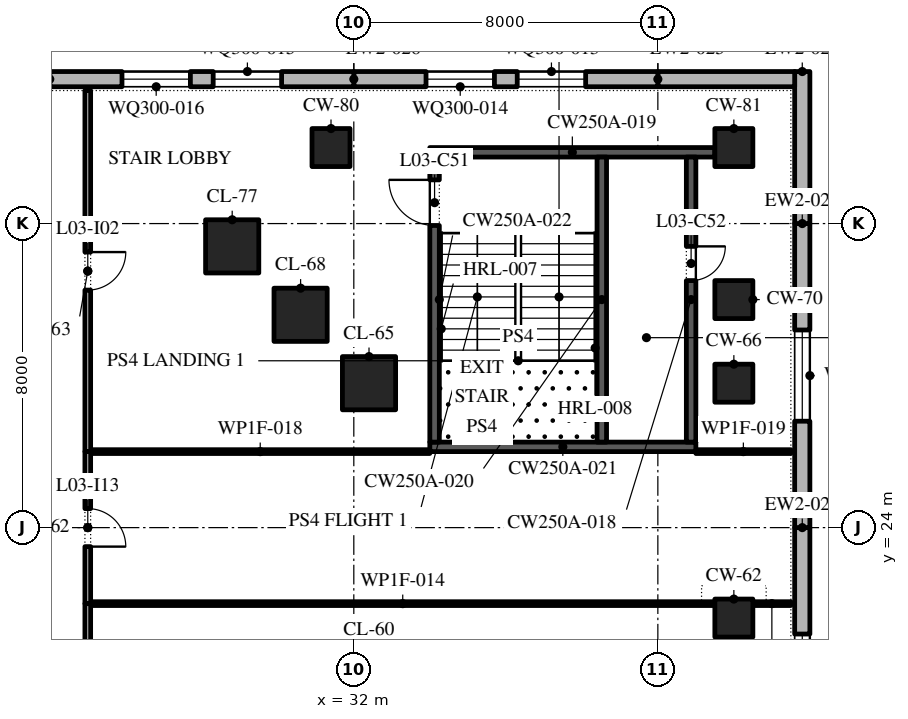
"""IFC4 building model, lengths in metres.
Left out: names, types, materials, properties, quantities, classifications, styles, units other than length and angle.
Written with IfcOpenShell. Run it as: python <this file> out.ifc"""

import sys

from ifc_helpers import new_model, si_unit, direction, frame, frame_2d, origin, origin_2d, place, context, subcontext, project, spatial, polyline, rectangle, outline, extrude, element, fill, save


model = new_model("IFC4")
c1 = context("Model", 3, precision=1e-05, world=origin(), true_north=direction((0.0, 1.0)))
c2 = subcontext(c1, "Body", "Model", "MODEL_VIEW")
j1 = project(units=[si_unit("LENGTHUNIT", "METRE"), si_unit("PLANEANGLEUNIT", "RADIAN")], contexts=[c1])
p1 = place(None, origin())
s1 = spatial("IfcSite", under=j1, at=p1, CompositionType="ELEMENT")
p2 = place(p1, origin())
s2 = spatial("IfcBuilding", under=s1, at=p2, CompositionType="ELEMENT")
p3 = place(p2, frame((0.0, 0.0, 19.2)))
s3 = spatial("IfcBuildingStorey", under=s2, at=p3, CompositionType="ELEMENT", Elevation=19.2)
p4 = place(p3, frame((42.0, 21.62, 0.0), z_axis=(0.0, 0.0, 1.0), x_axis=(1.0, 0.0, 0.0)))
e1 = element("IfcColumn", 1, at=p4, inside=s3, PredefinedType="COLUMN", context=c2, shape_type="SweptSolid", body=[
    extrude(rectangle(XDim=1.0, YDim=1.0, at=origin_2d()), origin(), (0.0, 0.0, 1.0), 4.8),
])
p5 = place(p3, frame((32.4, 27.8, 0.0), z_axis=(0.0, 0.0, 1.0), x_axis=(1.0, 0.0, 0.0)))
e2 = element("IfcColumn", 2, at=p5, inside=s3, PredefinedType="COLUMN", context=c2, shape_type="SweptSolid", body=[
    extrude(rectangle(XDim=1.4, YDim=1.4, at=origin_2d()), origin(), (0.0, 0.0, 1.0), 4.8),
])
p6 = place(p3, frame((42.0, 27.8, 0.0), z_axis=(0.0, 0.0, 1.0), x_axis=(1.0, 0.0, 0.0)))
e3 = element("IfcColumn", 3, at=p6, inside=s3, PredefinedType="COLUMN", context=c2, shape_type="SweptSolid", body=[
    extrude(rectangle(XDim=1.0, YDim=1.0, at=origin_2d()), origin(), (0.0, 0.0, 1.0), 4.8),
])
p7 = place(p3, frame((30.6, 29.6, 0.0), z_axis=(0.0, 0.0, 1.0), x_axis=(1.0, 0.0, 0.0)))
e4 = element("IfcColumn", 4, at=p7, inside=s3, PredefinedType="COLUMN", context=c2, shape_type="SweptSolid", body=[
    extrude(rectangle(XDim=1.4, YDim=1.4, at=origin_2d()), origin(), (0.0, 0.0, 1.0), 4.8),
])
p8 = place(p3, frame((42.0, 30.0, 0.0), z_axis=(0.0, 0.0, 1.0), x_axis=(1.0, 0.0, 0.0)))
e5 = element("IfcColumn", 5, at=p8, inside=s3, PredefinedType="COLUMN", context=c2, shape_type="SweptSolid", body=[
    extrude(rectangle(XDim=1.0, YDim=1.0, at=origin_2d()), origin(), (0.0, 0.0, 1.0), 4.8),
])
p9 = place(p3, frame((28.8, 31.4, 0.0), z_axis=(0.0, 0.0, 1.0), x_axis=(1.0, 0.0, 0.0)))
e6 = element("IfcColumn", 6, at=p9, inside=s3, PredefinedType="COLUMN", context=c2, shape_type="SweptSolid", body=[
    extrude(rectangle(XDim=1.4, YDim=1.4, at=origin_2d()), origin(), (0.0, 0.0, 1.0), 4.8),
])
for number, where, z_axis, x_axis in (
    (7, (31.4, 34.0, 0.0), (0.0, 0.0, 1.0), (1.0, 0.0, 0.0)),
    (8, (42.0, 34.0, 0.0), (0.0, 0.0, 1.0), (1.0, 0.0, 0.0)),
):
    element("IfcColumn", number, at=place(p3, frame(where, z_axis=z_axis, x_axis=x_axis)), inside=s3, PredefinedType="COLUMN", context=c2, shape_type="SweptSolid", body=[
        extrude(rectangle(XDim=1.0, YDim=1.0, at=origin_2d()), origin(), (0.0, 0.0, 1.0), 4.8),
    ])
p10 = place(p3, frame((43.8, 16.0, 0.0), z_axis=(0.0, 0.0, 1.0), x_axis=(0.0, 1.0, 0.0)))
e9 = element("IfcWall", 9, at=p10, inside=s3, PredefinedType="STANDARD", context=c2, shape_type="SweptSolid", body=[
    extrude(rectangle(XDim=8.0, YDim=0.4, at=frame_2d((4.0, 0.0))), origin(), (0.0, 0.0, 1.0), 4.5),
])
p11 = place(p10, frame((2.8, 0.0, 0.9)))
e10 = element("IfcOpeningElement", 10, at=p11, cuts=e9, PredefinedType="OPENING", context=c2, shape_type="SweptSolid", body=[
    extrude(outline(polyline([(0.0, 0.0), (2.4, 0.0), (2.4, 1.5), (2.378, 1.758), (2.313, 2.009), (2.207, 2.245), (2.063, 2.46), (1.885, 2.648), (1.677, 2.804), (1.447, 2.922), (1.2, 3.0), (0.953, 2.922), (0.722, 2.804), (0.515, 2.648), (0.337, 2.46), (0.193, 2.245), (0.087, 2.009), (0.022, 1.758), (0.0, 1.5), (0.0, 0.0)])), frame((0.0, 0.21, 0.0), z_axis=(0.0, -1.0, 0.0), x_axis=(1.0, 0.0, 0.0)), (0.0, 0.0, 1.0), 0.42),
])
p12 = place(p3, frame((43.8, 24.0, 0.0), z_axis=(0.0, 0.0, 1.0), x_axis=(0.0, 1.0, 0.0)))
e11 = element("IfcWall", 11, at=p12, inside=s3, PredefinedType="STANDARD", context=c2, shape_type="SweptSolid", body=[
    extrude(rectangle(XDim=8.0, YDim=0.4, at=frame_2d((4.0, 0.0))), origin(), (0.0, 0.0, 1.0), 4.5),
])
p13 = place(p12, frame((2.8, 0.0, 0.9)))
e12 = element("IfcOpeningElement", 12, at=p13, cuts=e11, PredefinedType="OPENING", context=c2, shape_type="SweptSolid", body=[
    extrude(outline(polyline([(0.0, 0.0), (2.4, 0.0), (2.4, 1.5), (2.378, 1.758), (2.313, 2.009), (2.207, 2.245), (2.063, 2.46), (1.885, 2.648), (1.677, 2.804), (1.447, 2.922), (1.2, 3.0), (0.953, 2.922), (0.722, 2.804), (0.515, 2.648), (0.337, 2.46), (0.193, 2.245), (0.087, 2.009), (0.022, 1.758), (0.0, 1.5), (0.0, 0.0)])), frame((0.0, 0.21, 0.0), z_axis=(0.0, -1.0, 0.0), x_axis=(1.0, 0.0, 0.0)), (0.0, 0.0, 1.0), 0.42),
])
p14 = place(p3, frame((43.8, 32.0, 0.0), z_axis=(0.0, 0.0, 1.0), x_axis=(0.0, 1.0, 0.0)))
e13 = element("IfcWall", 13, at=p14, inside=s3, PredefinedType="STANDARD", context=c2, shape_type="SweptSolid", body=[
    extrude(rectangle(XDim=4.0, YDim=0.4, at=frame_2d((2.0, 0.0))), origin(), (0.0, 0.0, 1.0), 4.5),
])
p15 = place(p3, frame((43.6, 35.8, 0.0), z_axis=(0.0, 0.0, 1.0), x_axis=(-1.0, 0.0, 0.0)))
e14 = element("IfcWall", 14, at=p15, inside=s3, PredefinedType="STANDARD", context=c2, shape_type="SweptSolid", body=[
    extrude(rectangle(XDim=3.6, YDim=0.4, at=frame_2d((1.8, 0.0))), origin(), (0.0, 0.0, 1.0), 4.5),
])
p16 = place(p3, frame((40.0, 35.8, 0.0), z_axis=(0.0, 0.0, 1.0), x_axis=(-1.0, 0.0, 0.0)))
e15 = element("IfcWall", 15, at=p16, inside=s3, PredefinedType="STANDARD", context=c2, shape_type="SweptSolid", body=[
    extrude(rectangle(XDim=8.0, YDim=0.4, at=frame_2d((4.0, 0.0))), origin(), (0.0, 0.0, 1.0), 4.5),
])
p17 = place(p16, frame((1.9, 0.0, 0.9)))
e16 = element("IfcOpeningElement", 16, at=p17, cuts=e15, PredefinedType="OPENING", context=c2, shape_type="SweptSolid", body=[
    extrude(outline(polyline([(0.0, 0.0), (1.8, 0.0), (1.8, 1.5), (1.785, 1.729), (1.738, 1.954), (1.662, 2.17), (1.558, 2.375), (1.427, 2.563), (1.271, 2.732), (1.095, 2.879), (0.9, 3.0), (0.705, 2.879), (0.529, 2.732), (0.373, 2.563), (0.242, 2.375), (0.138, 2.17), (0.062, 1.954), (0.015, 1.729), (0.0, 1.5), (0.0, 0.0)])), frame((0.0, 0.21, 0.0), z_axis=(0.0, -1.0, 0.0), x_axis=(1.0, 0.0, 0.0)), (0.0, 0.0, 1.0), 0.42),
])
p18 = place(p16, frame((4.3, 0.0, 0.9)))
e17 = element("IfcOpeningElement", 17, at=p18, cuts=e15, PredefinedType="OPENING", context=c2, shape_type="SweptSolid", body=[
    extrude(outline(polyline([(0.0, 0.0), (1.8, 0.0), (1.8, 1.5), (1.785, 1.729), (1.738, 1.954), (1.662, 2.17), (1.558, 2.375), (1.427, 2.563), (1.271, 2.732), (1.095, 2.879), (0.9, 3.0), (0.705, 2.879), (0.529, 2.732), (0.373, 2.563), (0.242, 2.375), (0.138, 2.17), (0.062, 1.954), (0.015, 1.729), (0.0, 1.5), (0.0, 0.0)])), frame((0.0, 0.21, 0.0), z_axis=(0.0, -1.0, 0.0), x_axis=(1.0, 0.0, 0.0)), (0.0, 0.0, 1.0), 0.42),
])
p19 = place(p3, frame((32.0, 35.8, 0.0), z_axis=(0.0, 0.0, 1.0), x_axis=(-1.0, 0.0, 0.0)))
e18 = element("IfcWall", 18, at=p19, inside=s3, PredefinedType="STANDARD", context=c2, shape_type="SweptSolid", body=[
    extrude(rectangle(XDim=8.0, YDim=0.4, at=frame_2d((4.0, 0.0))), origin(), (0.0, 0.0, 1.0), 4.5),
])
p20 = place(p19, frame((1.9, 0.0, 0.9)))
e19 = element("IfcOpeningElement", 19, at=p20, cuts=e18, PredefinedType="OPENING", context=c2, shape_type="SweptSolid", body=[
    extrude(outline(polyline([(0.0, 0.0), (1.8, 0.0), (1.8, 1.5), (1.785, 1.729), (1.738, 1.954), (1.662, 2.17), (1.558, 2.375), (1.427, 2.563), (1.271, 2.732), (1.095, 2.879), (0.9, 3.0), (0.705, 2.879), (0.529, 2.732), (0.373, 2.563), (0.242, 2.375), (0.138, 2.17), (0.062, 1.954), (0.015, 1.729), (0.0, 1.5), (0.0, 0.0)])), frame((0.0, 0.21, 0.0), z_axis=(0.0, -1.0, 0.0), x_axis=(1.0, 0.0, 0.0)), (0.0, 0.0, 1.0), 0.42),
])
p21 = place(p19, frame((4.3, 0.0, 0.9)))
e20 = element("IfcOpeningElement", 20, at=p21, cuts=e18, PredefinedType="OPENING", context=c2, shape_type="SweptSolid", body=[
    extrude(outline(polyline([(0.0, 0.0), (1.8, 0.0), (1.8, 1.5), (1.785, 1.729), (1.738, 1.954), (1.662, 2.17), (1.558, 2.375), (1.427, 2.563), (1.271, 2.732), (1.095, 2.879), (0.9, 3.0), (0.705, 2.879), (0.529, 2.732), (0.373, 2.563), (0.242, 2.375), (0.138, 2.17), (0.062, 1.954), (0.015, 1.729), (0.0, 1.5), (0.0, 0.0)])), frame((0.0, 0.21, 0.0), z_axis=(0.0, -1.0, 0.0), x_axis=(1.0, 0.0, 0.0)), (0.0, 0.0, 1.0), 0.42),
])
p22 = place(p3, frame((34.0, 26.125, 0.0), z_axis=(0.0, 0.0, 1.0), x_axis=(1.0, 0.0, 0.0)))
e21 = element("IfcWall", 21, at=p22, inside=s3, PredefinedType="SHEAR", context=c2, shape_type="SweptSolid", body=[
    extrude(rectangle(XDim=7.0, YDim=0.25, at=frame_2d((3.5, 0.0))), origin(), (0.0, 0.0, 1.0), 4.5),
])
p23 = place(p3, frame((34.0, 33.875, 0.0), z_axis=(0.0, 0.0, 1.0), x_axis=(1.0, 0.0, 0.0)))
e22 = element("IfcWall", 22, at=p23, inside=s3, PredefinedType="SHEAR", context=c2, shape_type="SweptSolid", body=[
    extrude(rectangle(XDim=7.5, YDim=0.25, at=frame_2d((3.75, 0.0))), origin(), (0.0, 0.0, 1.0), 4.5),
])
p24 = place(p3, frame((34.125, 26.25, 0.0), z_axis=(0.0, 0.0, 1.0), x_axis=(0.0, 1.0, 0.0)))
e23 = element("IfcWall", 23, at=p24, inside=s3, PredefinedType="SHEAR", context=c2, shape_type="SweptSolid", body=[
    extrude(rectangle(XDim=7.5, YDim=0.25, at=frame_2d((3.75, 0.0))), origin(), (0.0, 0.0, 1.0), 4.5),
])
p25 = place(p24, frame((5.7, 0.0, 0.0)))
e24 = element("IfcOpeningElement", 24, at=p25, cuts=e23, PredefinedType="OPENING", context=c2, shape_type="SweptSolid", body=[
    extrude(rectangle(XDim=1.2, YDim=2.1, at=frame_2d((0.6, 1.05))), frame((0.0, 0.135, 0.0), z_axis=(0.0, -1.0, 0.0), x_axis=(1.0, 0.0, 0.0)), (0.0, 0.0, 1.0), 0.27),
])
p26 = place(p3, frame((40.875, 26.25, 0.0), z_axis=(0.0, 0.0, 1.0), x_axis=(0.0, 1.0, 0.0)))
e25 = element("IfcWall", 25, at=p26, inside=s3, PredefinedType="SHEAR", context=c2, shape_type="SweptSolid", body=[
    extrude(rectangle(XDim=7.5, YDim=0.25, at=frame_2d((3.75, 0.0))), origin(), (0.0, 0.0, 1.0), 4.5),
])
p27 = place(p26, frame((4.25, 0.0, 0.0)))
e26 = element("IfcOpeningElement", 26, at=p27, cuts=e25, PredefinedType="OPENING", context=c2, shape_type="SweptSolid", body=[
    extrude(rectangle(XDim=0.9, YDim=2.1, at=frame_2d((0.45, 1.05))), frame((0.0, 0.135, 0.0), z_axis=(0.0, -1.0, 0.0), x_axis=(1.0, 0.0, 0.0)), (0.0, 0.0, 1.0), 0.27),
])
p28 = place(p3, frame((38.525, 26.25, 0.0), z_axis=(0.0, 0.0, 1.0), x_axis=(0.0, 1.0, 0.0)))
e27 = element("IfcWall", 27, at=p28, inside=s3, PredefinedType="SHEAR", context=c2, shape_type="SweptSolid", body=[
    extrude(rectangle(XDim=7.5, YDim=0.25, at=frame_2d((3.75, 0.0))), origin(), (0.0, 0.0, 1.0), 4.5),
])
p29 = place(p3, frame((25.075, 22.0, 0.0), z_axis=(0.0, 0.0, 1.0), x_axis=(1.0, 0.0, 0.0)))
e28 = element("IfcWall", 28, at=p29, inside=s3, PredefinedType="PARTITIONING", context=c2, shape_type="SweptSolid", body=[
    extrude(rectangle(XDim=16.425, YDim=0.1, at=frame_2d((8.212, 0.0))), origin(), (0.0, 0.0, 1.0), 4.5),
])
p30 = place(p3, frame((42.5, 22.0, 0.0), z_axis=(0.0, 0.0, 1.0), x_axis=(1.0, 0.0, 0.0)))
e29 = element("IfcWall", 29, at=p30, inside=s3, PredefinedType="PARTITIONING", context=c2, shape_type="SweptSolid", body=[
    extrude(rectangle(XDim=1.0, YDim=0.1, at=frame_2d((0.5, 0.0))), origin(), (0.0, 0.0, 1.0), 4.5),
])
p31 = place(p3, frame((25.075, 26.0, 0.0), z_axis=(0.0, 0.0, 1.0), x_axis=(1.0, 0.0, 0.0)))
e30 = element("IfcWall", 30, at=p31, inside=s3, PredefinedType="PARTITIONING", context=c2, shape_type="SweptSolid", body=[
    extrude(rectangle(XDim=8.925, YDim=0.1, at=frame_2d((4.462, 0.0))), origin(), (0.0, 0.0, 1.0), 4.5),
])
p32 = place(p3, frame((41.0, 26.0, 0.0), z_axis=(0.0, 0.0, 1.0), x_axis=(1.0, 0.0, 0.0)))
e31 = element("IfcWall", 31, at=p32, inside=s3, PredefinedType="PARTITIONING", context=c2, shape_type="SweptSolid", body=[
    extrude(rectangle(XDim=2.5, YDim=0.1, at=frame_2d((1.25, 0.0))), origin(), (0.0, 0.0, 1.0), 4.5),
])
p33 = place(p3, frame((25.0, 10.0, 0.0), z_axis=(0.0, 0.0, 1.0), x_axis=(0.0, 1.0, 0.0)))
e32 = element("IfcWall", 32, at=p33, inside=s3, PredefinedType="PARTITIONING", context=c2, shape_type="SweptSolid", body=[
    extrude(rectangle(XDim=12.0, YDim=0.15, at=frame_2d((6.0, 0.0))), origin(), (0.0, 0.0, 1.0), 4.5),
])
p34 = place(p33, frame((5.1, 0.0, 0.0)))
e33 = element("IfcOpeningElement", 33, at=p34, cuts=e32, PredefinedType="OPENING", context=c2, shape_type="SweptSolid", body=[
    extrude(rectangle(XDim=1.8, YDim=2.1, at=frame_2d((0.9, 1.05))), frame((0.0, 0.085, 0.0), z_axis=(0.0, -1.0, 0.0), x_axis=(1.0, 0.0, 0.0)), (0.0, 0.0, 1.0), 0.17),
])
p35 = place(p3, frame((25.0, 22.0, 0.0), z_axis=(0.0, 0.0, 1.0), x_axis=(0.0, 1.0, 0.0)))
e34 = element("IfcWall", 34, at=p35, inside=s3, PredefinedType="PARTITIONING", context=c2, shape_type="SweptSolid", body=[
    extrude(rectangle(XDim=4.0, YDim=0.15, at=frame_2d((2.0, 0.0))), origin(), (0.0, 0.0, 1.0), 4.5),
])
p36 = place(p35, frame((1.5, 0.0, 0.0)))
e35 = element("IfcOpeningElement", 35, at=p36, cuts=e34, PredefinedType="OPENING", context=c2, shape_type="SweptSolid", body=[
    extrude(rectangle(XDim=1.0, YDim=2.1, at=frame_2d((0.5, 1.05))), frame((0.0, 0.085, 0.0), z_axis=(0.0, -1.0, 0.0), x_axis=(1.0, 0.0, 0.0)), (0.0, 0.0, 1.0), 0.17),
])
p37 = place(p3, frame((25.0, 26.0, 0.0), z_axis=(0.0, 0.0, 1.0), x_axis=(0.0, 1.0, 0.0)))
e36 = element("IfcWall", 36, at=p37, inside=s3, PredefinedType="PARTITIONING", context=c2, shape_type="SweptSolid", body=[
    extrude(rectangle(XDim=9.5, YDim=0.15, at=frame_2d((4.75, 0.0))), origin(), (0.0, 0.0, 1.0), 4.5),
])
p38 = place(p37, frame((4.25, 0.0, 0.0)))
e37 = element("IfcOpeningElement", 37, at=p38, cuts=e36, PredefinedType="OPENING", context=c2, shape_type="SweptSolid", body=[
    extrude(rectangle(XDim=1.0, YDim=2.1, at=frame_2d((0.5, 1.05))), frame((0.0, 0.085, 0.0), z_axis=(0.0, -1.0, 0.0), x_axis=(1.0, 0.0, 0.0)), (0.0, 0.0, 1.0), 0.17),
])
p39 = place(p11, origin())
e38 = element("IfcWindow", 38, at=p39, inside=s3, PartitioningType="DOUBLE_PANEL_VERTICAL", PredefinedType="WINDOW", context=c2, shape_type="SweptSolid", body=[
    extrude(outline(polyline([(0.0, 0.0), (2.4, 0.0), (2.4, 1.5), (2.378, 1.758), (2.313, 2.009), (2.207, 2.245), (2.063, 2.46), (1.885, 2.648), (1.677, 2.804), (1.447, 2.922), (1.2, 3.0), (0.953, 2.922), (0.722, 2.804), (0.515, 2.648), (0.337, 2.46), (0.193, 2.245), (0.087, 2.009), (0.022, 1.758), (0.0, 1.5), (0.0, 0.0)])), frame((0.0, 0.03, 0.0), z_axis=(0.0, -1.0, 0.0), x_axis=(1.0, 0.0, 0.0)), (0.0, 0.0, 1.0), 0.06),
])
fill(e10, e38)
p40 = place(p13, origin())
e39 = element("IfcWindow", 39, at=p40, inside=s3, PartitioningType="DOUBLE_PANEL_VERTICAL", PredefinedType="WINDOW", context=c2, shape_type="SweptSolid", body=[
    extrude(outline(polyline([(0.0, 0.0), (2.4, 0.0), (2.4, 1.5), (2.378, 1.758), (2.313, 2.009), (2.207, 2.245), (2.063, 2.46), (1.885, 2.648), (1.677, 2.804), (1.447, 2.922), (1.2, 3.0), (0.953, 2.922), (0.722, 2.804), (0.515, 2.648), (0.337, 2.46), (0.193, 2.245), (0.087, 2.009), (0.022, 1.758), (0.0, 1.5), (0.0, 0.0)])), frame((0.0, 0.03, 0.0), z_axis=(0.0, -1.0, 0.0), x_axis=(1.0, 0.0, 0.0)), (0.0, 0.0, 1.0), 0.06),
])
fill(e12, e39)
p41 = place(p17, origin())
e40 = element("IfcWindow", 40, at=p41, inside=s3, PartitioningType="DOUBLE_PANEL_VERTICAL", PredefinedType="WINDOW", context=c2, shape_type="SweptSolid", body=[
    extrude(outline(polyline([(0.0, 0.0), (1.8, 0.0), (1.8, 1.5), (1.785, 1.729), (1.738, 1.954), (1.662, 2.17), (1.558, 2.375), (1.427, 2.563), (1.271, 2.732), (1.095, 2.879), (0.9, 3.0), (0.705, 2.879), (0.529, 2.732), (0.373, 2.563), (0.242, 2.375), (0.138, 2.17), (0.062, 1.954), (0.015, 1.729), (0.0, 1.5), (0.0, 0.0)])), frame((0.0, 0.03, 0.0), z_axis=(0.0, -1.0, 0.0), x_axis=(1.0, 0.0, 0.0)), (0.0, 0.0, 1.0), 0.06),
])
fill(e16, e40)
p42 = place(p18, origin())
e41 = element("IfcWindow", 41, at=p42, inside=s3, PartitioningType="DOUBLE_PANEL_VERTICAL", PredefinedType="WINDOW", context=c2, shape_type="SweptSolid", body=[
    extrude(outline(polyline([(0.0, 0.0), (1.8, 0.0), (1.8, 1.5), (1.785, 1.729), (1.738, 1.954), (1.662, 2.17), (1.558, 2.375), (1.427, 2.563), (1.271, 2.732), (1.095, 2.879), (0.9, 3.0), (0.705, 2.879), (0.529, 2.732), (0.373, 2.563), (0.242, 2.375), (0.138, 2.17), (0.062, 1.954), (0.015, 1.729), (0.0, 1.5), (0.0, 0.0)])), frame((0.0, 0.03, 0.0), z_axis=(0.0, -1.0, 0.0), x_axis=(1.0, 0.0, 0.0)), (0.0, 0.0, 1.0), 0.06),
])
fill(e17, e41)
p43 = place(p20, origin())
e42 = element("IfcWindow", 42, at=p43, inside=s3, PartitioningType="DOUBLE_PANEL_VERTICAL", PredefinedType="WINDOW", context=c2, shape_type="SweptSolid", body=[
    extrude(outline(polyline([(0.0, 0.0), (1.8, 0.0), (1.8, 1.5), (1.785, 1.729), (1.738, 1.954), (1.662, 2.17), (1.558, 2.375), (1.427, 2.563), (1.271, 2.732), (1.095, 2.879), (0.9, 3.0), (0.705, 2.879), (0.529, 2.732), (0.373, 2.563), (0.242, 2.375), (0.138, 2.17), (0.062, 1.954), (0.015, 1.729), (0.0, 1.5), (0.0, 0.0)])), frame((0.0, 0.03, 0.0), z_axis=(0.0, -1.0, 0.0), x_axis=(1.0, 0.0, 0.0)), (0.0, 0.0, 1.0), 0.06),
])
fill(e19, e42)
p44 = place(p21, origin())
e43 = element("IfcWindow", 43, at=p44, inside=s3, PartitioningType="DOUBLE_PANEL_VERTICAL", PredefinedType="WINDOW", context=c2, shape_type="SweptSolid", body=[
    extrude(outline(polyline([(0.0, 0.0), (1.8, 0.0), (1.8, 1.5), (1.785, 1.729), (1.738, 1.954), (1.662, 2.17), (1.558, 2.375), (1.427, 2.563), (1.271, 2.732), (1.095, 2.879), (0.9, 3.0), (0.705, 2.879), (0.529, 2.732), (0.373, 2.563), (0.242, 2.375), (0.138, 2.17), (0.062, 1.954), (0.015, 1.729), (0.0, 1.5), (0.0, 0.0)])), frame((0.0, 0.03, 0.0), z_axis=(0.0, -1.0, 0.0), x_axis=(1.0, 0.0, 0.0)), (0.0, 0.0, 1.0), 0.06),
])
fill(e20, e43)
p45 = place(p25, origin())
e44 = element("IfcDoor", 44, at=p45, inside=s3, OperationType="SINGLE_SWING_LEFT", PredefinedType="DOOR", context=c2, shape_type="SweptSolid", body=[
    extrude(rectangle(XDim=1.2, YDim=2.1, at=frame_2d((0.6, 1.05))), frame((0.0, 0.025, 0.0), z_axis=(0.0, -1.0, 0.0), x_axis=(1.0, 0.0, 0.0)), (0.0, 0.0, 1.0), 0.05),
])
fill(e24, e44)
p46 = place(p27, frame((0.9, 0.2, 0.0), z_axis=(0.0, 0.0, 1.0), x_axis=(-1.0, 0.0, 0.0)))
e45 = element("IfcDoor", 45, at=p46, inside=s3, OperationType="SINGLE_SWING_RIGHT", PredefinedType="DOOR", context=c2, shape_type="SweptSolid", body=[
    extrude(rectangle(XDim=0.9, YDim=2.1, at=frame_2d((0.45, 1.05))), frame((0.0, 0.125, 0.0), z_axis=(0.0, -1.0, 0.0), x_axis=(1.0, 0.0, 0.0)), (0.0, 0.0, 1.0), 0.05),
])
fill(e26, e45)
p47 = place(p38, frame((1.0, 0.0, 0.0), z_axis=(0.0, 0.0, 1.0), x_axis=(-1.0, 0.0, 0.0)))
e46 = element("IfcDoor", 46, at=p47, inside=s3, OperationType="SINGLE_SWING_RIGHT", PredefinedType="DOOR", context=c2, shape_type="SweptSolid", body=[
    extrude(rectangle(XDim=1.0, YDim=2.1, at=frame_2d((0.5, 1.05))), frame((0.0, 0.025, 0.0), z_axis=(0.0, -1.0, 0.0), x_axis=(1.0, 0.0, 0.0)), (0.0, 0.0, 1.0), 0.05),
])
fill(e37, e46)
p48 = place(p36, frame((1.0, 0.0, 0.0), z_axis=(0.0, 0.0, 1.0), x_axis=(-1.0, 0.0, 0.0)))
e47 = element("IfcDoor", 47, at=p48, inside=s3, OperationType="SINGLE_SWING_LEFT", PredefinedType="DOOR", context=c2, shape_type="SweptSolid", body=[
    extrude(rectangle(XDim=1.0, YDim=2.1, at=frame_2d((0.5, 1.05))), frame((0.0, 0.025, 0.0), z_axis=(0.0, -1.0, 0.0), x_axis=(1.0, 0.0, 0.0)), (0.0, 0.0, 1.0), 0.05),
])
fill(e35, e47)
save(model, sys.argv[1])
